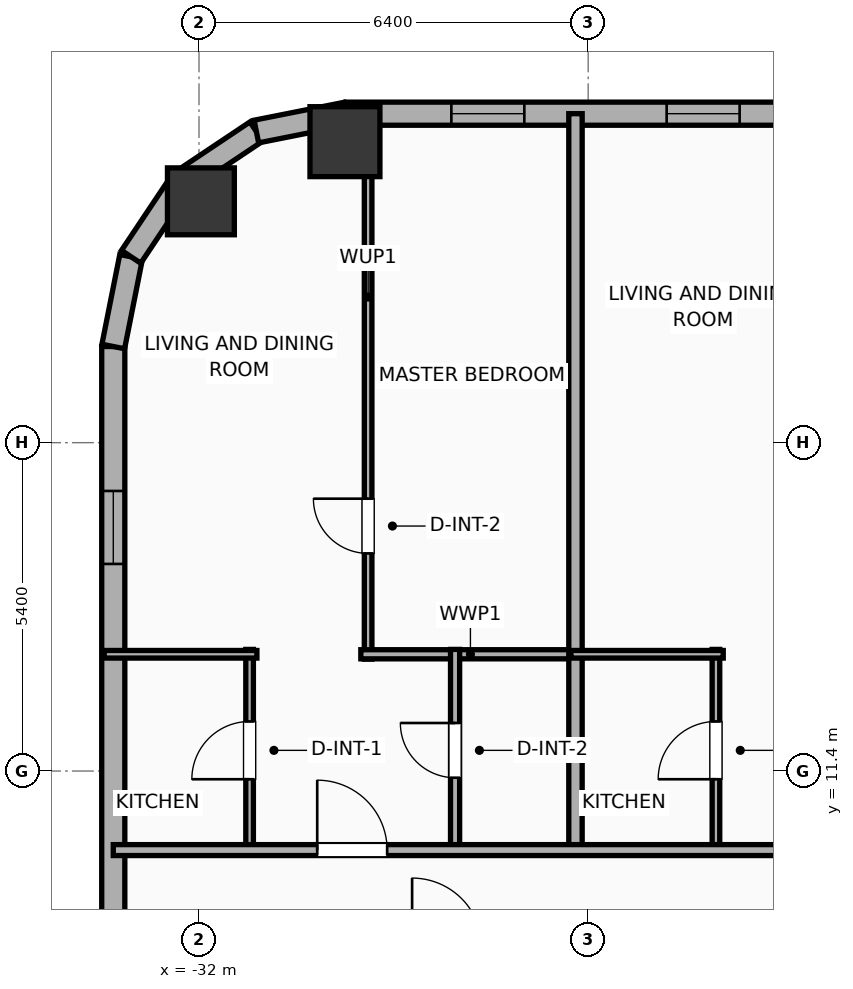
"""IFC4 building model, lengths in metres.
Left out: names, types, materials, properties, quantities, classifications, styles, units other than length and angle.
Written with IfcOpenShell. Run it as: python <this file> out.ifc"""

import sys

from ifc_helpers import new_model, si_unit, direction, frame, frame_2d, origin, origin_2d, place, context, subcontext, project, spatial, rectangle, hollow_rectangle, hollow_circle, extrude, element, fill, save


model = new_model("IFC4")
c1 = context("Model", 3, precision=1e-05, world=origin(), true_north=direction((0.0, 1.0)))
c2 = subcontext(c1, "Body", "Model", "MODEL_VIEW")
j1 = project(units=[si_unit("LENGTHUNIT", "METRE"), si_unit("PLANEANGLEUNIT", "RADIAN")], contexts=[c1])
p1 = place(None, origin())
s1 = spatial("IfcSite", under=j1, at=p1, CompositionType="ELEMENT")
p2 = place(p1, origin())
s2 = spatial("IfcBuilding", under=s1, at=p2, CompositionType="ELEMENT")
p3 = place(p2, frame((0.0, 0.0, 37.7)))
s3 = spatial("IfcBuildingStorey", under=s2, at=p3, CompositionType="ELEMENT", Elevation=37.7)
p4 = place(p3, frame((-29.6, 21.75, 0.0), z_axis=(0.0, 0.0, 1.0), x_axis=(1.0, 0.0, 0.0)))
e1 = element("IfcColumn", 1, at=p4, inside=s3, PredefinedType="COLUMN", context=c2, shape_type="SweptSolid", body=[
    extrude(hollow_rectangle(XDim=1.15, YDim=1.15, WallThickness=0.04, at=origin_2d()), origin(), (0.0, 0.0, 1.0), 3.9),
])
p5 = place(p3, frame((-31.969, 20.769, 0.0), z_axis=(0.0, 0.0, 1.0), x_axis=(1.0, 0.0, 0.0)))
e2 = element("IfcColumn", 2, at=p5, inside=s3, PredefinedType="COLUMN", context=c2, shape_type="SweptSolid", body=[
    extrude(hollow_circle(Radius=0.55, WallThickness=0.036, at=origin_2d()), origin(), (0.0, 0.0, 1.0), 3.9),
])
p6 = place(p3, frame((-33.41, -18.381, 0.0), z_axis=(0.0, 0.0, 1.0), x_axis=(0.0, 1.0, 0.0)))
e3 = element("IfcWall", 3, at=p6, inside=s3, PredefinedType="ELEMENTEDWALL", context=c2, shape_type="SweptSolid", body=[
    extrude(rectangle(XDim=36.763, YDim=0.38, at=frame_2d((18.381, 0.0))), origin(), (0.0, 0.0, 1.0), 3.65),
])
p7 = place(p6, frame((33.187, 0.0, 0.75)))
e4 = element("IfcOpeningElement", 4, at=p7, cuts=e3, PredefinedType="OPENING", context=c2, shape_type="SweptSolid", body=[
    extrude(rectangle(XDim=1.2, YDim=2.05, at=frame_2d((0.6, 1.025))), frame((0.0, 0.2, 0.0), z_axis=(0.0, -1.0, 0.0), x_axis=(1.0, 0.0, 0.0)), (0.0, 0.0, 1.0), 0.4),
])
p8 = place(p6, frame((22.126, 0.0, 0.75)))
e5 = element("IfcOpeningElement", 5, at=p8, cuts=e3, PredefinedType="OPENING", context=c2, shape_type="SweptSolid", body=[
    extrude(rectangle(XDim=1.2, YDim=2.05, at=frame_2d((0.6, 1.025))), frame((0.0, 0.2, 0.0), z_axis=(0.0, -1.0, 0.0), x_axis=(1.0, 0.0, 0.0)), (0.0, 0.0, 1.0), 0.4),
])
p9 = place(p6, frame((13.576, 0.0, 0.75)))
e6 = element("IfcOpeningElement", 6, at=p9, cuts=e3, PredefinedType="OPENING", context=c2, shape_type="SweptSolid", body=[
    extrude(rectangle(XDim=1.2, YDim=2.05, at=frame_2d((0.6, 1.025))), frame((0.0, 0.2, 0.0), z_axis=(0.0, -1.0, 0.0), x_axis=(1.0, 0.0, 0.0)), (0.0, 0.0, 1.0), 0.4),
])
p10 = place(p3, frame((-33.41, 18.381, 0.0), z_axis=(0.0, 0.0, 1.0), x_axis=(0.195086038585, 0.980786132421, 0.0)))
e7 = element("IfcWall", 7, at=p10, inside=s3, PredefinedType="ELEMENTEDWALL", context=c2, shape_type="SweptSolid", body=[
    extrude(rectangle(XDim=1.504, YDim=0.38, at=frame_2d((0.752, 0.0))), origin(), (0.0, 0.0, 1.0), 3.65),
])
p11 = place(p3, frame((-33.116, 19.857, 0.0), z_axis=(0.0, 0.0, 1.0), x_axis=(0.555572577804, 0.831468045563, 0.0)))
e8 = element("IfcWall", 8, at=p11, inside=s3, PredefinedType="ELEMENTEDWALL", context=c2, shape_type="SweptSolid", body=[
    extrude(rectangle(XDim=1.485, YDim=0.38, at=frame_2d((0.742, 0.0))), origin(), (0.0, 0.0, 1.0), 3.65),
])
p12 = place(p3, frame((-32.292, 21.091, 0.0), z_axis=(0.0, 0.0, 1.0), x_axis=(0.831442848281, 0.555610286119, 0.0)))
e9 = element("IfcWall", 9, at=p12, inside=s3, PredefinedType="ELEMENTEDWALL", context=c2, shape_type="SweptSolid", body=[
    extrude(rectangle(XDim=1.485, YDim=0.38, at=frame_2d((0.743, 0.0))), origin(), (0.0, 0.0, 1.0), 3.65),
])
p13 = place(p3, frame((-31.057, 21.917, 0.0), z_axis=(0.0, 0.0, 1.0), x_axis=(0.980786132421, 0.195086038585, 0.0)))
e10 = element("IfcWall", 10, at=p13, inside=s3, PredefinedType="ELEMENTEDWALL", context=c2, shape_type="SweptSolid", body=[
    extrude(rectangle(XDim=1.504, YDim=0.38, at=frame_2d((0.752, 0.0))), origin(), (0.0, 0.0, 1.0), 3.65),
])
p14 = place(p3, frame((-29.581, 22.21, 0.0), z_axis=(0.0, 0.0, 1.0), x_axis=(1.0, 0.0, 0.0)))
e11 = element("IfcWall", 11, at=p14, inside=s3, PredefinedType="ELEMENTEDWALL", context=c2, shape_type="SweptSolid", body=[
    extrude(rectangle(XDim=51.963, YDim=0.38, at=frame_2d((25.981, 0.0))), origin(), (0.0, 0.0, 1.0), 3.65),
])
p15 = place(p14, frame((25.631, 0.0, 0.75)))
e12 = element("IfcOpeningElement", 12, at=p15, cuts=e11, PredefinedType="OPENING", context=c2, shape_type="SweptSolid", body=[
    extrude(rectangle(XDim=2.4, YDim=2.1, at=frame_2d((1.2, 1.05))), frame((0.0, 0.2, 0.0), z_axis=(0.0, -1.0, 0.0), x_axis=(1.0, 0.0, 0.0)), (0.0, 0.0, 1.0), 0.4),
])
p16 = place(p14, frame((42.952, 0.0, 0.75)))
e13 = element("IfcOpeningElement", 13, at=p16, cuts=e11, PredefinedType="OPENING", context=c2, shape_type="SweptSolid", body=[
    extrude(rectangle(XDim=2.4, YDim=2.1, at=frame_2d((1.2, 1.05))), frame((0.0, 0.2, 0.0), z_axis=(0.0, -1.0, 0.0), x_axis=(1.0, 0.0, 0.0)), (0.0, 0.0, 1.0), 0.4),
])
p17 = place(p14, frame((1.731, 0.0, 0.75)))
e14 = element("IfcOpeningElement", 14, at=p17, cuts=e11, PredefinedType="OPENING", context=c2, shape_type="SweptSolid", body=[
    extrude(rectangle(XDim=1.2, YDim=2.05, at=frame_2d((0.6, 1.025))), frame((0.0, 0.2, 0.0), z_axis=(0.0, -1.0, 0.0), x_axis=(1.0, 0.0, 0.0)), (0.0, 0.0, 1.0), 0.4),
])
p18 = place(p14, frame((5.272, 0.0, 0.75)))
e15 = element("IfcOpeningElement", 15, at=p18, cuts=e11, PredefinedType="OPENING", context=c2, shape_type="SweptSolid", body=[
    extrude(rectangle(XDim=1.2, YDim=2.05, at=frame_2d((0.6, 1.025))), frame((0.0, 0.2, 0.0), z_axis=(0.0, -1.0, 0.0), x_axis=(1.0, 0.0, 0.0)), (0.0, 0.0, 1.0), 0.4),
])
p19 = place(p14, frame((8.356, 0.0, 0.75)))
e16 = element("IfcOpeningElement", 16, at=p19, cuts=e11, PredefinedType="OPENING", context=c2, shape_type="SweptSolid", body=[
    extrude(rectangle(XDim=1.2, YDim=2.05, at=frame_2d((0.6, 1.025))), frame((0.0, 0.2, 0.0), z_axis=(0.0, -1.0, 0.0), x_axis=(1.0, 0.0, 0.0)), (0.0, 0.0, 1.0), 0.4),
])
p20 = place(p14, frame((15.632, 0.0, 0.75)))
e17 = element("IfcOpeningElement", 17, at=p20, cuts=e11, PredefinedType="OPENING", context=c2, shape_type="SweptSolid", body=[
    extrude(rectangle(XDim=1.2, YDim=2.05, at=frame_2d((0.6, 1.025))), frame((0.0, 0.2, 0.0), z_axis=(0.0, -1.0, 0.0), x_axis=(1.0, 0.0, 0.0)), (0.0, 0.0, 1.0), 0.4),
])
p21 = place(p14, frame((12.137, 0.0, 0.75)))
e18 = element("IfcOpeningElement", 18, at=p21, cuts=e11, PredefinedType="OPENING", context=c2, shape_type="SweptSolid", body=[
    extrude(rectangle(XDim=1.2, YDim=2.05, at=frame_2d((0.6, 1.025))), frame((0.0, 0.2, 0.0), z_axis=(0.0, -1.0, 0.0), x_axis=(1.0, 0.0, 0.0)), (0.0, 0.0, 1.0), 0.4),
])
p22 = place(p14, frame((18.756, 0.0, 0.75)))
e19 = element("IfcOpeningElement", 19, at=p22, cuts=e11, PredefinedType="OPENING", context=c2, shape_type="SweptSolid", body=[
    extrude(rectangle(XDim=1.2, YDim=2.05, at=frame_2d((0.6, 1.025))), frame((0.0, 0.2, 0.0), z_axis=(0.0, -1.0, 0.0), x_axis=(1.0, 0.0, 0.0)), (0.0, 0.0, 1.0), 0.4),
])
p23 = place(p14, frame((22.907, 0.0, 0.75)))
e20 = element("IfcOpeningElement", 20, at=p23, cuts=e11, PredefinedType="OPENING", context=c2, shape_type="SweptSolid", body=[
    extrude(rectangle(XDim=1.2, YDim=2.05, at=frame_2d((0.6, 1.025))), frame((0.0, 0.2, 0.0), z_axis=(0.0, -1.0, 0.0), x_axis=(1.0, 0.0, 0.0)), (0.0, 0.0, 1.0), 0.4),
])
p24 = place(p14, frame((36.381, 0.0, 0.75)))
e21 = element("IfcOpeningElement", 21, at=p24, cuts=e11, PredefinedType="OPENING", context=c2, shape_type="SweptSolid", body=[
    extrude(rectangle(XDim=1.2, YDim=2.05, at=frame_2d((0.6, 1.025))), frame((0.0, 0.2, 0.0), z_axis=(0.0, -1.0, 0.0), x_axis=(1.0, 0.0, 0.0)), (0.0, 0.0, 1.0), 0.4),
])
p25 = place(p14, frame((32.886, 0.0, 0.75)))
e22 = element("IfcOpeningElement", 22, at=p25, cuts=e11, PredefinedType="OPENING", context=c2, shape_type="SweptSolid", body=[
    extrude(rectangle(XDim=1.2, YDim=2.05, at=frame_2d((0.6, 1.025))), frame((0.0, 0.2, 0.0), z_axis=(0.0, -1.0, 0.0), x_axis=(1.0, 0.0, 0.0)), (0.0, 0.0, 1.0), 0.4),
])
p26 = place(p14, frame((39.556, 0.0, 0.75)))
e23 = element("IfcOpeningElement", 23, at=p26, cuts=e11, PredefinedType="OPENING", context=c2, shape_type="SweptSolid", body=[
    extrude(rectangle(XDim=1.2, YDim=2.05, at=frame_2d((0.6, 1.025))), frame((0.0, 0.2, 0.0), z_axis=(0.0, -1.0, 0.0), x_axis=(1.0, 0.0, 0.0)), (0.0, 0.0, 1.0), 0.4),
])
p27 = place(p14, frame((46.885, 0.0, 0.75)))
e24 = element("IfcOpeningElement", 24, at=p27, cuts=e11, PredefinedType="OPENING", context=c2, shape_type="SweptSolid", body=[
    extrude(rectangle(XDim=1.2, YDim=2.05, at=frame_2d((0.6, 1.025))), frame((0.0, 0.2, 0.0), z_axis=(0.0, -1.0, 0.0), x_axis=(1.0, 0.0, 0.0)), (0.0, 0.0, 1.0), 0.4),
])
p28 = place(p14, frame((49.531, 0.0, 0.75)))
e25 = element("IfcOpeningElement", 25, at=p28, cuts=e11, PredefinedType="OPENING", context=c2, shape_type="SweptSolid", body=[
    extrude(rectangle(XDim=1.2, YDim=2.05, at=frame_2d((0.6, 1.025))), frame((0.0, 0.2, 0.0), z_axis=(0.0, -1.0, 0.0), x_axis=(1.0, 0.0, 0.0)), (0.0, 0.0, 1.0), 0.4),
])
p29 = place(p3, frame((-29.219, 13.24, 0.0), z_axis=(0.0, 0.0, 1.0), x_axis=(0.0, 1.0, 0.0)))
e26 = element("IfcWall", 26, at=p29, inside=s3, PredefinedType="PARTITIONING", context=c2, shape_type="SweptSolid", body=[
    extrude(rectangle(XDim=9.12, YDim=0.125, at=frame_2d((4.56, 0.0))), origin(), (0.0, 0.0, 1.0), 3.65),
])
p30 = place(p29, frame((1.739, 0.0, 0.0)))
e27 = element("IfcOpeningElement", 27, at=p30, cuts=e26, PredefinedType="OPENING", context=c2, shape_type="SweptSolid", body=[
    extrude(rectangle(XDim=0.9, YDim=2.05, at=frame_2d((0.45, 1.025))), frame((0.0, 0.073, 0.0), z_axis=(0.0, -1.0, 0.0), x_axis=(1.0, 0.0, 0.0)), (0.0, 0.0, 1.0), 0.145),
])
p31 = place(p3, frame((-29.339, 13.32, 0.0), z_axis=(0.0, 0.0, 1.0), x_axis=(1.0, 0.0, 0.0)))
e28 = element("IfcWall", 28, at=p31, inside=s3, PredefinedType="PLUMBINGWALL", context=c2, shape_type="SweptSolid", body=[
    extrude(rectangle(XDim=3.605, YDim=0.15, at=frame_2d((1.803, 0.0))), origin(), (0.0, 0.0, 1.0), 3.65),
])
p32 = place(p3, frame((-31.168, 10.08, 0.0), z_axis=(0.0, 0.0, 1.0), x_axis=(0.0, 1.0, 0.0)))
e29 = element("IfcWall", 29, at=p32, inside=s3, PredefinedType="PARTITIONING", context=c2, shape_type="SweptSolid", body=[
    extrude(rectangle(XDim=3.32, YDim=0.125, at=frame_2d((1.66, 0.0))), origin(), (0.0, 0.0, 1.0), 3.65),
])
p33 = place(p32, frame((1.185, 0.0, 0.0)))
e30 = element("IfcOpeningElement", 30, at=p33, cuts=e29, PredefinedType="OPENING", context=c2, shape_type="SweptSolid", body=[
    extrude(rectangle(XDim=0.95, YDim=2.05, at=frame_2d((0.475, 1.025))), frame((0.0, 0.073, 0.0), z_axis=(0.0, -1.0, 0.0), x_axis=(1.0, 0.0, 0.0)), (0.0, 0.0, 1.0), 0.145),
])
p34 = place(p3, frame((-33.56, 13.32, 0.0), z_axis=(0.0, 0.0, 1.0), x_axis=(1.0, 0.0, 0.0)))
e31 = element("IfcWall", 31, at=p34, inside=s3, PredefinedType="PARTITIONING", context=c2, shape_type="SweptSolid", body=[
    extrude(rectangle(XDim=2.512, YDim=0.125, at=frame_2d((1.256, 0.0))), origin(), (0.0, 0.0, 1.0), 3.65),
])
p35 = place(p3, frame((-27.789, 10.08, 0.0), z_axis=(0.0, 0.0, 1.0), x_axis=(0.0, 1.0, 0.0)))
e32 = element("IfcWall", 32, at=p35, inside=s3, PredefinedType="PLUMBINGWALL", context=c2, shape_type="SweptSolid", body=[
    extrude(rectangle(XDim=3.32, YDim=0.15, at=frame_2d((1.66, 0.0))), origin(), (0.0, 0.0, 1.0), 3.65),
])
p36 = place(p35, frame((1.21, 0.0, 0.0)))
e33 = element("IfcOpeningElement", 33, at=p36, cuts=e32, PredefinedType="OPENING", context=c2, shape_type="SweptSolid", body=[
    extrude(rectangle(XDim=0.9, YDim=2.05, at=frame_2d((0.45, 1.025))), frame((0.0, 0.085, 0.0), z_axis=(0.0, -1.0, 0.0), x_axis=(1.0, 0.0, 0.0)), (0.0, 0.0, 1.0), 0.17),
])
p37 = place(p3, frame((-25.809, 10.02, 0.0), z_axis=(0.0, 0.0, 1.0), x_axis=(0.0, 1.0, 0.0)))
e34 = element("IfcWall", 34, at=p37, inside=s3, PredefinedType="PARTITIONING", context=c2, shape_type="SweptSolid", body=[
    extrude(rectangle(XDim=12.19, YDim=0.22, at=frame_2d((6.095, 0.0))), origin(), (0.0, 0.0, 1.0), 3.65),
])
p38 = place(p3, frame((-23.499, 10.08, 0.0), z_axis=(0.0, 0.0, 1.0), x_axis=(0.0, 1.0, 0.0)))
e35 = element("IfcWall", 35, at=p38, inside=s3, PredefinedType="PARTITIONING", context=c2, shape_type="SweptSolid", body=[
    extrude(rectangle(XDim=3.32, YDim=0.125, at=frame_2d((1.66, 0.0))), origin(), (0.0, 0.0, 1.0), 3.65),
])
p39 = place(p38, frame((1.185, 0.0, 0.0)))
e36 = element("IfcOpeningElement", 36, at=p39, cuts=e35, PredefinedType="OPENING", context=c2, shape_type="SweptSolid", body=[
    extrude(rectangle(XDim=0.95, YDim=2.05, at=frame_2d((0.475, 1.025))), frame((0.0, 0.073, 0.0), z_axis=(0.0, -1.0, 0.0), x_axis=(1.0, 0.0, 0.0)), (0.0, 0.0, 1.0), 0.145),
])
p40 = place(p3, frame((-25.884, 13.32, 0.0), z_axis=(0.0, 0.0, 1.0), x_axis=(1.0, 0.0, 0.0)))
e37 = element("IfcWall", 37, at=p40, inside=s3, PredefinedType="PARTITIONING", context=c2, shape_type="SweptSolid", body=[
    extrude(rectangle(XDim=2.505, YDim=0.125, at=frame_2d((1.252, 0.0))), origin(), (0.0, 0.0, 1.0), 3.65),
])
p41 = place(p3, frame((-33.41, 10.1, 0.0), z_axis=(0.0, 0.0, 1.0), x_axis=(1.0, 0.0, 0.0)))
e38 = element("IfcWall", 38, at=p41, inside=s3, PredefinedType="PARTITIONING", context=c2, shape_type="SweptSolid", body=[
    extrude(rectangle(XDim=59.62, YDim=0.18, at=frame_2d((29.81, 0.0))), origin(), (0.0, 0.0, 1.0), 3.65),
])
p42 = place(p41, frame((3.354, 0.0, 0.0)))
e39 = element("IfcOpeningElement", 39, at=p42, cuts=e38, PredefinedType="OPENING", context=c2, shape_type="SweptSolid", body=[
    extrude(rectangle(XDim=1.15, YDim=2.05, at=frame_2d((0.575, 1.025))), frame((0.0, 0.1, 0.0), z_axis=(0.0, -1.0, 0.0), x_axis=(1.0, 0.0, 0.0)), (0.0, 0.0, 1.0), 0.2),
])
p43 = place(p41, frame((10.997, 0.0, 0.0)))
e40 = element("IfcOpeningElement", 40, at=p43, cuts=e38, PredefinedType="OPENING", context=c2, shape_type="SweptSolid", body=[
    extrude(rectangle(XDim=1.15, YDim=2.05, at=frame_2d((0.575, 1.025))), frame((0.0, 0.1, 0.0), z_axis=(0.0, -1.0, 0.0), x_axis=(1.0, 0.0, 0.0)), (0.0, 0.0, 1.0), 0.2),
])
p44 = place(p41, frame((20.232, 0.0, 0.0)))
e41 = element("IfcOpeningElement", 41, at=p44, cuts=e38, PredefinedType="OPENING", context=c2, shape_type="SweptSolid", body=[
    extrude(rectangle(XDim=1.15, YDim=2.05, at=frame_2d((0.575, 1.025))), frame((0.0, 0.1, 0.0), z_axis=(0.0, -1.0, 0.0), x_axis=(1.0, 0.0, 0.0)), (0.0, 0.0, 1.0), 0.2),
])
p45 = place(p41, frame((30.38, 0.0, 0.0)))
e42 = element("IfcOpeningElement", 42, at=p45, cuts=e38, PredefinedType="OPENING", context=c2, shape_type="SweptSolid", body=[
    extrude(rectangle(XDim=1.15, YDim=2.05, at=frame_2d((0.575, 1.025))), frame((0.0, 0.1, 0.0), z_axis=(0.0, -1.0, 0.0), x_axis=(1.0, 0.0, 0.0)), (0.0, 0.0, 1.0), 0.2),
])
p46 = place(p41, frame((40.998, 0.0, 0.0)))
e43 = element("IfcOpeningElement", 43, at=p46, cuts=e38, PredefinedType="OPENING", context=c2, shape_type="SweptSolid", body=[
    extrude(rectangle(XDim=1.15, YDim=2.05, at=frame_2d((0.575, 1.025))), frame((0.0, 0.1, 0.0), z_axis=(0.0, -1.0, 0.0), x_axis=(1.0, 0.0, 0.0)), (0.0, 0.0, 1.0), 0.2),
])
p47 = place(p41, frame((49.428, 0.0, 0.0)))
e44 = element("IfcOpeningElement", 44, at=p47, cuts=e38, PredefinedType="OPENING", context=c2, shape_type="SweptSolid", body=[
    extrude(rectangle(XDim=0.9, YDim=2.05, at=frame_2d((0.45, 1.025))), frame((0.0, 0.1, 0.0), z_axis=(0.0, -1.0, 0.0), x_axis=(1.0, 0.0, 0.0)), (0.0, 0.0, 1.0), 0.2),
])
p48 = place(p41, frame((56.07, 0.0, 0.0)))
e45 = element("IfcOpeningElement", 45, at=p48, cuts=e38, PredefinedType="OPENING", context=c2, shape_type="SweptSolid", body=[
    extrude(rectangle(XDim=0.9, YDim=2.05, at=frame_2d((0.45, 1.025))), frame((0.0, 0.1, 0.0), z_axis=(0.0, -1.0, 0.0), x_axis=(1.0, 0.0, 0.0)), (0.0, 0.0, 1.0), 0.2),
])
p49 = place(p7, origin())
e46 = element("IfcWindow", 46, at=p49, inside=s3, PartitioningType="SINGLE_PANEL", PredefinedType="WINDOW", context=c2, shape_type="SweptSolid", body=[
    extrude(rectangle(XDim=1.2, YDim=2.05, at=frame_2d((0.6, 1.025))), frame((0.0, 0.03, 0.0), z_axis=(0.0, -1.0, 0.0), x_axis=(1.0, 0.0, 0.0)), (0.0, 0.0, 1.0), 0.06),
])
fill(e4, e46)
p50 = place(p17, origin())
e47 = element("IfcWindow", 47, at=p50, inside=s3, PartitioningType="SINGLE_PANEL", PredefinedType="WINDOW", context=c2, shape_type="SweptSolid", body=[
    extrude(rectangle(XDim=1.2, YDim=2.05, at=frame_2d((0.6, 1.025))), frame((0.0, 0.03, 0.0), z_axis=(0.0, -1.0, 0.0), x_axis=(1.0, 0.0, 0.0)), (0.0, 0.0, 1.0), 0.06),
])
fill(e14, e47)
p51 = place(p18, origin())
e48 = element("IfcWindow", 48, at=p51, inside=s3, PartitioningType="SINGLE_PANEL", PredefinedType="WINDOW", context=c2, shape_type="SweptSolid", body=[
    extrude(rectangle(XDim=1.2, YDim=2.05, at=frame_2d((0.6, 1.025))), frame((0.0, 0.03, 0.0), z_axis=(0.0, -1.0, 0.0), x_axis=(1.0, 0.0, 0.0)), (0.0, 0.0, 1.0), 0.06),
])
fill(e15, e48)
p52 = place(p30, origin())
e49 = element("IfcDoor", 49, at=p52, inside=s3, OperationType="SINGLE_SWING_RIGHT", PredefinedType="DOOR", context=c2, shape_type="SweptSolid", body=[
    extrude(rectangle(XDim=0.9, YDim=2.05, at=frame_2d((0.45, 1.025))), frame((0.0, 0.025, 0.0), z_axis=(0.0, -1.0, 0.0), x_axis=(1.0, 0.0, 0.0)), (0.0, 0.0, 1.0), 0.05),
])
fill(e27, e49)
p53 = place(p33, origin())
e50 = element("IfcDoor", 50, at=p53, inside=s3, OperationType="SINGLE_SWING_LEFT", PredefinedType="DOOR", context=c2, shape_type="SweptSolid", body=[
    extrude(rectangle(XDim=0.95, YDim=2.05, at=frame_2d((0.475, 1.025))), frame((0.0, 0.025, 0.0), z_axis=(0.0, -1.0, 0.0), x_axis=(1.0, 0.0, 0.0)), (0.0, 0.0, 1.0), 0.05),
])
fill(e30, e50)
p54 = place(p36, origin())
e51 = element("IfcDoor", 51, at=p54, inside=s3, OperationType="SINGLE_SWING_RIGHT", PredefinedType="DOOR", context=c2, shape_type="SweptSolid", body=[
    extrude(rectangle(XDim=0.9, YDim=2.05, at=frame_2d((0.45, 1.025))), frame((0.0, 0.025, 0.0), z_axis=(0.0, -1.0, 0.0), x_axis=(1.0, 0.0, 0.0)), (0.0, 0.0, 1.0), 0.05),
])
fill(e33, e51)
p55 = place(p39, origin())
e52 = element("IfcDoor", 52, at=p55, inside=s3, OperationType="SINGLE_SWING_LEFT", PredefinedType="DOOR", context=c2, shape_type="SweptSolid", body=[
    extrude(rectangle(XDim=0.95, YDim=2.05, at=frame_2d((0.475, 1.025))), frame((0.0, 0.025, 0.0), z_axis=(0.0, -1.0, 0.0), x_axis=(1.0, 0.0, 0.0)), (0.0, 0.0, 1.0), 0.05),
])
fill(e36, e52)
p56 = place(p42, origin())
e53 = element("IfcDoor", 53, at=p56, inside=s3, OperationType="SINGLE_SWING_LEFT", PredefinedType="DOOR", context=c2, shape_type="SweptSolid", body=[
    extrude(rectangle(XDim=1.15, YDim=2.05, at=frame_2d((0.575, 1.025))), frame((0.0, 0.025, 0.0), z_axis=(0.0, -1.0, 0.0), x_axis=(1.0, 0.0, 0.0)), (0.0, 0.0, 1.0), 0.05),
])
fill(e39, e53)
save(model, sys.argv[1])
